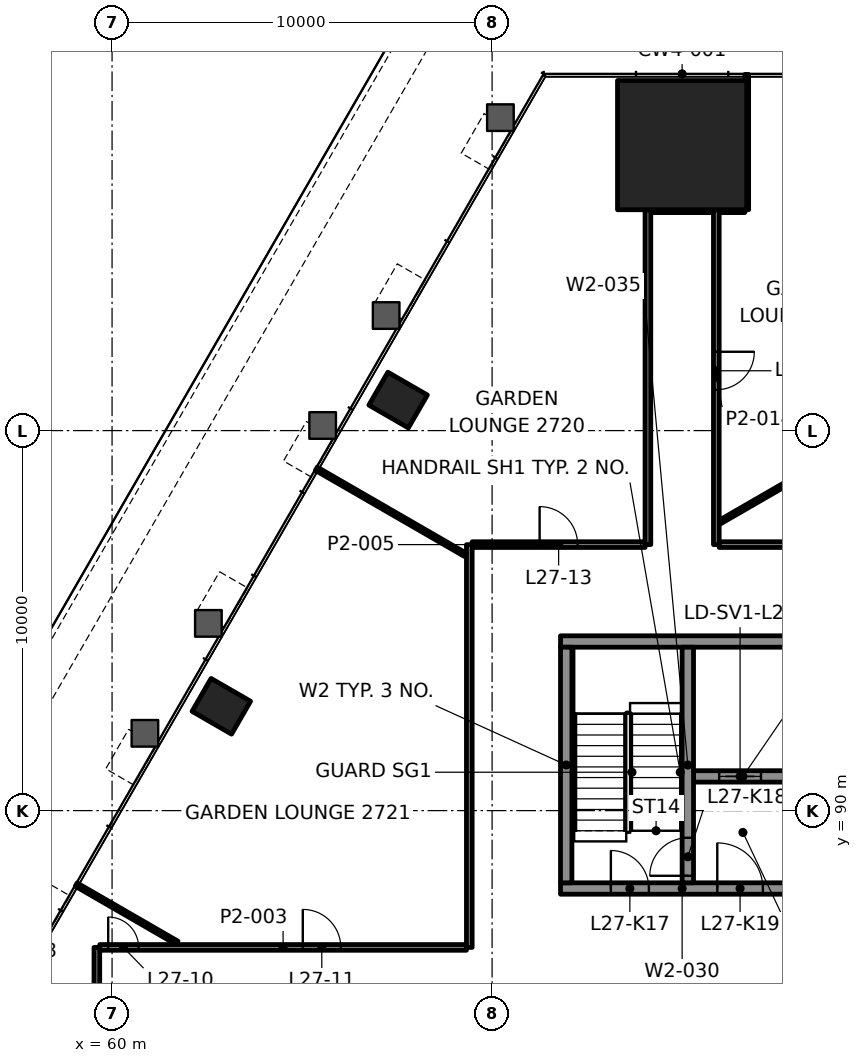
"""IFC4 building model, lengths in metres.
Left out: names, types, materials, properties, quantities, classifications, styles, units other than length and angle.
Written with IfcOpenShell. Run it as: python <this file> out.ifc"""

import sys

from ifc_helpers import new_model, si_unit, direction, frame, frame_2d, origin, origin_2d, place, context, subcontext, project, spatial, rectangle, extrude, element, fill, save


model = new_model("IFC4")
c1 = context("Model", 3, precision=1e-05, world=origin(), true_north=direction((0.0, 1.0)))
c2 = subcontext(c1, "Body", "Model", "MODEL_VIEW")
j1 = project(units=[si_unit("LENGTHUNIT", "METRE"), si_unit("PLANEANGLEUNIT", "RADIAN")], contexts=[c1])
p1 = place(None, origin())
s1 = spatial("IfcSite", under=j1, at=p1, CompositionType="ELEMENT")
p2 = place(p1, origin())
s2 = spatial("IfcBuilding", under=s1, at=p2, CompositionType="ELEMENT")
p3 = place(p2, frame((0.0, 0.0, 119.8)))
s3 = spatial("IfcBuildingStorey", under=s2, at=p3, CompositionType="ELEMENT", Elevation=119.8)
p4 = place(p3, frame((75.0, 107.512, 0.0), z_axis=(0.0, 0.0, 1.0), x_axis=(-1.0, 0.0, 0.0)))
e1 = element("IfcColumn", 1, at=p4, inside=s3, PredefinedType="COLUMN", context=c2, shape_type="SweptSolid", body=[
    extrude(rectangle(XDim=3.4, YDim=3.4, at=origin_2d()), origin(), (0.0, 0.0, 1.0), 4.2),
])
for number, where, z_axis, x_axis in (
    (2, (67.527, 100.804, -0.0), (0.0, 0.0, 1.0), (-0.5, -0.866, 0.0)),
    (3, (62.874, 92.745, -0.0), (0.0, 0.0, 1.0), (-0.5, -0.866, 0.0)),
):
    element("IfcColumn", number, at=place(p3, frame(where, z_axis=z_axis, x_axis=x_axis)), inside=s3, PredefinedType="COLUMN", context=c2, shape_type="SweptSolid", body=[
        extrude(rectangle(XDim=1.0, YDim=1.2, at=origin_2d()), origin(), (0.0, 0.0, 1.0), 4.2),
    ])
p5 = place(p3, frame((71.8, 87.95, 0.0), z_axis=(0.0, 0.0, 1.0), x_axis=(1.0, 0.0, 0.0)))
e4 = element("IfcWall", 4, at=p5, inside=s3, PredefinedType="SHEAR", context=c2, shape_type="SweptSolid", body=[
    extrude(rectangle(XDim=6.4, YDim=0.3, at=frame_2d((3.2, 0.0))), origin(), (0.0, 0.0, 1.0), 4.0),
])
p6 = place(p5, frame((1.325, 0.0, 0.0)))
e5 = element("IfcOpeningElement", 5, at=p6, cuts=e4, PredefinedType="OPENING", context=c2, shape_type="SweptSolid", body=[
    extrude(rectangle(XDim=1.0, YDim=2.1, at=frame_2d((0.5, 1.05))), frame((0.0, 0.16, 0.0), z_axis=(0.0, -1.0, 0.0), x_axis=(1.0, 0.0, 0.0)), (0.0, 0.0, 1.0), 0.32),
])
p7 = place(p5, frame((4.125, 0.0, 0.0)))
e6 = element("IfcOpeningElement", 6, at=p7, cuts=e4, PredefinedType="OPENING", context=c2, shape_type="SweptSolid", body=[
    extrude(rectangle(XDim=1.2, YDim=2.1, at=frame_2d((0.6, 1.05))), frame((0.0, 0.16, 0.0), z_axis=(0.0, -1.0, 0.0), x_axis=(1.0, 0.0, 0.0)), (0.0, 0.0, 1.0), 0.32),
])
p8 = place(p3, frame((71.8, 94.45, 0.0), z_axis=(0.0, 0.0, 1.0), x_axis=(1.0, 0.0, 0.0)))
e7 = element("IfcWall", 7, at=p8, inside=s3, PredefinedType="SHEAR", context=c2, shape_type="SweptSolid", body=[
    extrude(rectangle(XDim=6.4, YDim=0.3, at=frame_2d((3.2, 0.0))), origin(), (0.0, 0.0, 1.0), 4.0),
])
p9 = place(p3, frame((71.95, 88.1, 0.0), z_axis=(0.0, 0.0, 1.0), x_axis=(0.0, 1.0, 0.0)))
e8 = element("IfcWall", 8, at=p9, inside=s3, PredefinedType="SHEAR", context=c2, shape_type="SweptSolid", body=[
    extrude(rectangle(XDim=6.2, YDim=0.3, at=frame_2d((3.1, 0.0))), origin(), (0.0, 0.0, 1.0), 4.0),
])
p10 = place(p3, frame((75.3, 90.9, 0.0), z_axis=(0.0, 0.0, 1.0), x_axis=(1.0, 0.0, 0.0)))
e9 = element("IfcWall", 9, at=p10, inside=s3, PredefinedType="SHEAR", context=c2, shape_type="SweptSolid", body=[
    extrude(rectangle(XDim=2.6, YDim=0.3, at=frame_2d((1.3, 0.0))), origin(), (0.0, 0.0, 1.0), 4.0),
])
p11 = place(p10, frame((0.675, 0.0, 0.0)))
e10 = element("IfcOpeningElement", 10, at=p11, cuts=e9, PredefinedType="OPENING", context=c2, shape_type="SweptSolid", body=[
    extrude(rectangle(XDim=1.1, YDim=2.1, at=frame_2d((0.55, 1.05))), frame((0.0, 0.16, 0.0), z_axis=(0.0, -1.0, 0.0), x_axis=(1.0, 0.0, 0.0)), (0.0, 0.0, 1.0), 0.32),
])
p12 = place(p3, frame((75.15, 88.1, 0.0), z_axis=(0.0, 0.0, 1.0), x_axis=(0.0, 1.0, 0.0)))
e11 = element("IfcWall", 11, at=p12, inside=s3, PredefinedType="SHEAR", context=c2, shape_type="SweptSolid", body=[
    extrude(rectangle(XDim=6.2, YDim=0.3, at=frame_2d((3.1, 0.0))), origin(), (0.0, 0.0, 1.0), 4.0),
])
p13 = place(p12, frame((0.185, 0.0, 0.0)))
e12 = element("IfcOpeningElement", 12, at=p13, cuts=e11, PredefinedType="OPENING", context=c2, shape_type="SweptSolid", body=[
    extrude(rectangle(XDim=1.0, YDim=2.1, at=frame_2d((0.5, 1.05))), frame((0.0, 0.16, 0.0), z_axis=(0.0, -1.0, 0.0), x_axis=(1.0, 0.0, 0.0)), (0.0, 0.0, 1.0), 0.32),
])
p14 = place(p3, frame((59.676, 86.4, 0.0), z_axis=(0.0, 0.0, 1.0), x_axis=(1.0, 0.0, 0.0)))
e13 = element("IfcWall", 13, at=p14, inside=s3, PredefinedType="PARTITIONING", context=c2, shape_type="SweptSolid", body=[
    extrude(rectangle(XDim=9.649, YDim=0.15, at=frame_2d((4.825, 0.0))), origin(), (0.0, 0.0, 1.0), 3.4),
])
p15 = place(p14, frame((0.223, 0.0, 0.0)))
e14 = element("IfcOpeningElement", 14, at=p15, cuts=e13, PredefinedType="OPENING", context=c2, shape_type="SweptSolid", body=[
    extrude(rectangle(XDim=0.8, YDim=2.1, at=frame_2d((0.4, 1.05))), frame((0.0, 0.085, 0.0), z_axis=(0.0, -1.0, 0.0), x_axis=(1.0, 0.0, 0.0)), (0.0, 0.0, 1.0), 0.17),
])
p16 = place(p14, frame((5.343, 0.0, 0.0)))
e15 = element("IfcOpeningElement", 15, at=p16, cuts=e13, PredefinedType="OPENING", context=c2, shape_type="SweptSolid", body=[
    extrude(rectangle(XDim=1.0, YDim=2.1, at=frame_2d((0.5, 1.05))), frame((0.0, 0.085, 0.0), z_axis=(0.0, -1.0, 0.0), x_axis=(1.0, 0.0, 0.0)), (0.0, 0.0, 1.0), 0.17),
])
p17 = place(p3, frame((69.476, 97.0, 0.0), z_axis=(0.0, 0.0, 1.0), x_axis=(1.0, 0.0, 0.0)))
e16 = element("IfcWall", 16, at=p17, inside=s3, PredefinedType="PARTITIONING", context=c2, shape_type="SweptSolid", body=[
    extrude(rectangle(XDim=4.549, YDim=0.15, at=frame_2d((2.275, 0.0))), origin(), (0.0, 0.0, 1.0), 3.4),
])
p18 = place(p17, frame((1.775, 0.0, 0.0)))
e17 = element("IfcOpeningElement", 17, at=p18, cuts=e16, PredefinedType="OPENING", context=c2, shape_type="SweptSolid", body=[
    extrude(rectangle(XDim=1.0, YDim=2.1, at=frame_2d((0.5, 1.05))), frame((0.0, 0.085, 0.0), z_axis=(0.0, -1.0, 0.0), x_axis=(1.0, 0.0, 0.0)), (0.0, 0.0, 1.0), 0.17),
])
p19 = place(p3, frame((80.524, 97.0, 0.0), z_axis=(0.0, 0.0, 1.0), x_axis=(-1.0, 0.0, 0.0)))
e18 = element("IfcWall", 18, at=p19, inside=s3, PredefinedType="PARTITIONING", context=c2, shape_type="SweptSolid", body=[
    extrude(rectangle(XDim=4.549, YDim=0.15, at=frame_2d((2.275, 0.0))), origin(), (0.0, 0.0, 1.0), 3.4),
])
p20 = place(p19, frame((1.775, 0.0, 0.0)))
e19 = element("IfcOpeningElement", 19, at=p20, cuts=e18, PredefinedType="OPENING", context=c2, shape_type="SweptSolid", body=[
    extrude(rectangle(XDim=1.0, YDim=2.1, at=frame_2d((0.5, 1.05))), frame((0.0, 0.085, 0.0), z_axis=(0.0, -1.0, 0.0), x_axis=(1.0, 0.0, 0.0)), (0.0, 0.0, 1.0), 0.17),
])
p21 = place(p3, frame((74.176, 105.812, 0.0), z_axis=(0.0, 0.0, 1.0), x_axis=(1.0, 0.0, 0.0)))
e20 = element("IfcWall", 20, at=p21, inside=s3, PredefinedType="PARTITIONING", context=c2, shape_type="SweptSolid", body=[
    extrude(rectangle(XDim=1.649, YDim=0.15, at=frame_2d((0.825, 0.0))), origin(), (0.0, 0.0, 1.0), 3.397),
])
p22 = place(p3, frame((76.001, 97.598, 0.0), z_axis=(0.0, 0.0, 1.0), x_axis=(0.866017611601, 0.500013496215, 0.0)))
e21 = element("IfcWall", 21, at=p22, inside=s3, PredefinedType="PARTITIONING", context=c2, shape_type="SweptSolid", body=[
    extrude(rectangle(XDim=6.608, YDim=0.1, at=frame_2d((3.304, 0.0))), origin(), (0.0, 0.0, 1.0), 3.4),
])
p23 = place(p3, frame((76.7, 105.813, 0.0), z_axis=(0.0, 0.0, 1.0), x_axis=(0.0, 1.0, 0.0)))
e22 = element("IfcWall", 22, at=p23, inside=s3, PredefinedType="PARTITIONING", context=c2, shape_type="SweptSolid", body=[
    extrude(rectangle(XDim=3.559, YDim=0.1, at=frame_2d((1.78, 0.0))), origin(), (0.0, 0.0, 1.0), 3.4),
])
p24 = place(p3, frame((75.9, 105.812, 0.0), z_axis=(0.0, 0.0, 1.0), x_axis=(0.0, -1.0, 0.0)))
e23 = element("IfcWall", 23, at=p24, inside=s3, PredefinedType="PARTITIONING", context=c2, shape_type="SweptSolid", body=[
    extrude(rectangle(XDim=8.812, YDim=0.15, at=frame_2d((4.406, 0.0))), origin(), (0.0, 0.0, 1.0), 3.4),
])
p25 = place(p24, frame((3.738, 0.0, 0.0)))
e24 = element("IfcOpeningElement", 24, at=p25, cuts=e23, PredefinedType="OPENING", context=c2, shape_type="SweptSolid", body=[
    extrude(rectangle(XDim=1.0, YDim=2.1, at=frame_2d((0.5, 1.05))), frame((0.0, 0.085, 0.0), z_axis=(0.0, -1.0, 0.0), x_axis=(1.0, 0.0, 0.0)), (0.0, 0.0, 1.0), 0.17),
])
p26 = place(p3, frame((74.1, 97.0, 0.0), z_axis=(0.0, 0.0, 1.0), x_axis=(0.0, 1.0, 0.0)))
e25 = element("IfcWall", 25, at=p26, inside=s3, PredefinedType="PARTITIONING", context=c2, shape_type="SweptSolid", body=[
    extrude(rectangle(XDim=8.812, YDim=0.15, at=frame_2d((4.406, 0.0))), origin(), (0.0, 0.0, 1.0), 3.4),
])
p27 = place(p3, frame((69.4, 86.4, 0.0), z_axis=(0.0, 0.0, 1.0), x_axis=(0.0, 1.0, 0.0)))
e26 = element("IfcWall", 26, at=p27, inside=s3, PredefinedType="PARTITIONING", context=c2, shape_type="SweptSolid", body=[
    extrude(rectangle(XDim=10.6, YDim=0.15, at=frame_2d((5.3, 0.0))), origin(), (0.0, 0.0, 1.0), 3.322),
])
p28 = place(p3, frame((59.6, 67.148, 0.0), z_axis=(0.0, 0.0, 1.0), x_axis=(0.0, 1.0, 0.0)))
e27 = element("IfcWall", 27, at=p28, inside=s3, PredefinedType="PARTITIONING", context=c2, shape_type="SweptSolid", body=[
    extrude(rectangle(XDim=19.251, YDim=0.15, at=frame_2d((9.626, 0.0))), origin(), (0.0, 0.0, 1.0), 3.4),
])
p29 = place(p3, frame((69.299, 96.73, 0.0), z_axis=(0.0, 0.0, 1.0), x_axis=(-0.866033061154, 0.499986736812, 0.0)))
e28 = element("IfcWall", 28, at=p29, inside=s3, PredefinedType="PARTITIONING", context=c2, shape_type="SweptSolid", body=[
    extrude(rectangle(XDim=4.531, YDim=0.1, at=frame_2d((2.266, 0.0))), origin(), (0.0, 0.0, 1.0), 3.165),
])
p30 = place(p3, frame((61.71, 86.52, 0.0), z_axis=(0.0, 0.0, 1.0), x_axis=(-0.866038331766, 0.499977607411, 0.0)))
e29 = element("IfcWall", 29, at=p30, inside=s3, PredefinedType="PARTITIONING", context=c2, shape_type="SweptSolid", body=[
    extrude(rectangle(XDim=3.065, YDim=0.1, at=frame_2d((1.532, 0.0))), origin(), (0.0, 0.0, 1.0), 3.165),
])
p31 = place(p3, frame((75.975, 105.812, 0.0), z_axis=(0.0, 0.0, 1.0), x_axis=(1.0, 0.0, 0.0)))
e30 = element("IfcWall", 30, at=p31, inside=s3, PredefinedType="PARTITIONING", context=c2, shape_type="SweptSolid", body=[
    extrude(rectangle(XDim=0.674, YDim=0.15, at=frame_2d((0.337, 0.0))), origin(), (0.0, 0.0, 1.0), 3.4),
])
p32 = place(p3, frame((69.117, 112.258, 0.0), z_axis=(0.0, 0.0, 1.0), x_axis=(-0.500000992643, -0.866024830681, 0.0)))
e31 = element("IfcWall", 31, at=p32, inside=s3, PredefinedType="SOLIDWALL", context=c2, shape_type="SweptSolid", body=[
    extrude(rectangle(XDim=58.649, YDim=0.8, at=frame_2d((29.325, 0.0))), origin(), (0.0, 0.0, 1.0), 0.9),
])
p33 = place(p15, origin())
e32 = element("IfcDoor", 32, at=p33, inside=s3, OperationType="SINGLE_SWING_LEFT", PredefinedType="DOOR", context=c2, shape_type="SweptSolid", body=[
    extrude(rectangle(XDim=0.8, YDim=2.1, at=frame_2d((0.4, 1.05))), frame((0.0, 0.025, 0.0), z_axis=(0.0, -1.0, 0.0), x_axis=(1.0, 0.0, 0.0)), (0.0, 0.0, 1.0), 0.05),
])
fill(e14, e32)
p34 = place(p16, origin())
e33 = element("IfcDoor", 33, at=p34, inside=s3, OperationType="SINGLE_SWING_RIGHT", PredefinedType="DOOR", context=c2, shape_type="SweptSolid", body=[
    extrude(rectangle(XDim=1.0, YDim=2.1, at=frame_2d((0.5, 1.05))), frame((0.0, 0.025, 0.0), z_axis=(0.0, -1.0, 0.0), x_axis=(1.0, 0.0, 0.0)), (0.0, 0.0, 1.0), 0.05),
])
fill(e15, e33)
p35 = place(p18, origin())
e34 = element("IfcDoor", 34, at=p35, inside=s3, OperationType="SINGLE_SWING_LEFT", PredefinedType="DOOR", context=c2, shape_type="SweptSolid", body=[
    extrude(rectangle(XDim=1.0, YDim=2.1, at=frame_2d((0.5, 1.05))), frame((0.0, 0.025, 0.0), z_axis=(0.0, -1.0, 0.0), x_axis=(1.0, 0.0, 0.0)), (0.0, 0.0, 1.0), 0.05),
])
fill(e17, e34)
p36 = place(p25, origin())
e35 = element("IfcDoor", 35, at=p36, inside=s3, OperationType="SINGLE_SWING_LEFT", PredefinedType="DOOR", context=c2, shape_type="SweptSolid", body=[
    extrude(rectangle(XDim=1.0, YDim=2.1, at=frame_2d((0.5, 1.05))), frame((0.0, 0.025, 0.0), z_axis=(0.0, -1.0, 0.0), x_axis=(1.0, 0.0, 0.0)), (0.0, 0.0, 1.0), 0.05),
])
fill(e24, e35)
p37 = place(p11, origin())
e36 = element("IfcDoor", 36, at=p37, inside=s3, OperationType="DOUBLE_DOOR_SLIDING", PredefinedType="DOOR", context=c2, shape_type="SweptSolid", body=[
    extrude(rectangle(XDim=1.1, YDim=2.1, at=frame_2d((0.55, 1.05))), frame((0.0, 0.025, 0.0), z_axis=(0.0, -1.0, 0.0), x_axis=(1.0, 0.0, 0.0)), (0.0, 0.0, 1.0), 0.05),
])
fill(e10, e36)
p38 = place(p6, origin())
e37 = element("IfcDoor", 37, at=p38, inside=s3, OperationType="SINGLE_SWING_RIGHT", PredefinedType="DOOR", context=c2, shape_type="SweptSolid", body=[
    extrude(rectangle(XDim=1.0, YDim=2.1, at=frame_2d((0.5, 1.05))), frame((0.0, 0.025, 0.0), z_axis=(0.0, -1.0, 0.0), x_axis=(1.0, 0.0, 0.0)), (0.0, 0.0, 1.0), 0.05),
])
fill(e5, e37)
p39 = place(p13, origin())
e38 = element("IfcDoor", 38, at=p39, inside=s3, OperationType="SINGLE_SWING_LEFT", PredefinedType="DOOR", context=c2, shape_type="SweptSolid", body=[
    extrude(rectangle(XDim=1.0, YDim=2.1, at=frame_2d((0.5, 1.05))), frame((0.0, 0.025, 0.0), z_axis=(0.0, -1.0, 0.0), x_axis=(1.0, 0.0, 0.0)), (0.0, 0.0, 1.0), 0.05),
])
fill(e12, e38)
p40 = place(p7, origin())
e39 = element("IfcDoor", 39, at=p40, inside=s3, OperationType="SINGLE_SWING_RIGHT", PredefinedType="DOOR", context=c2, shape_type="SweptSolid", body=[
    extrude(rectangle(XDim=1.2, YDim=2.1, at=frame_2d((0.6, 1.05))), frame((0.0, 0.025, 0.0), z_axis=(0.0, -1.0, 0.0), x_axis=(1.0, 0.0, 0.0)), (0.0, 0.0, 1.0), 0.05),
])
fill(e6, e39)
save(model, sys.argv[1])
